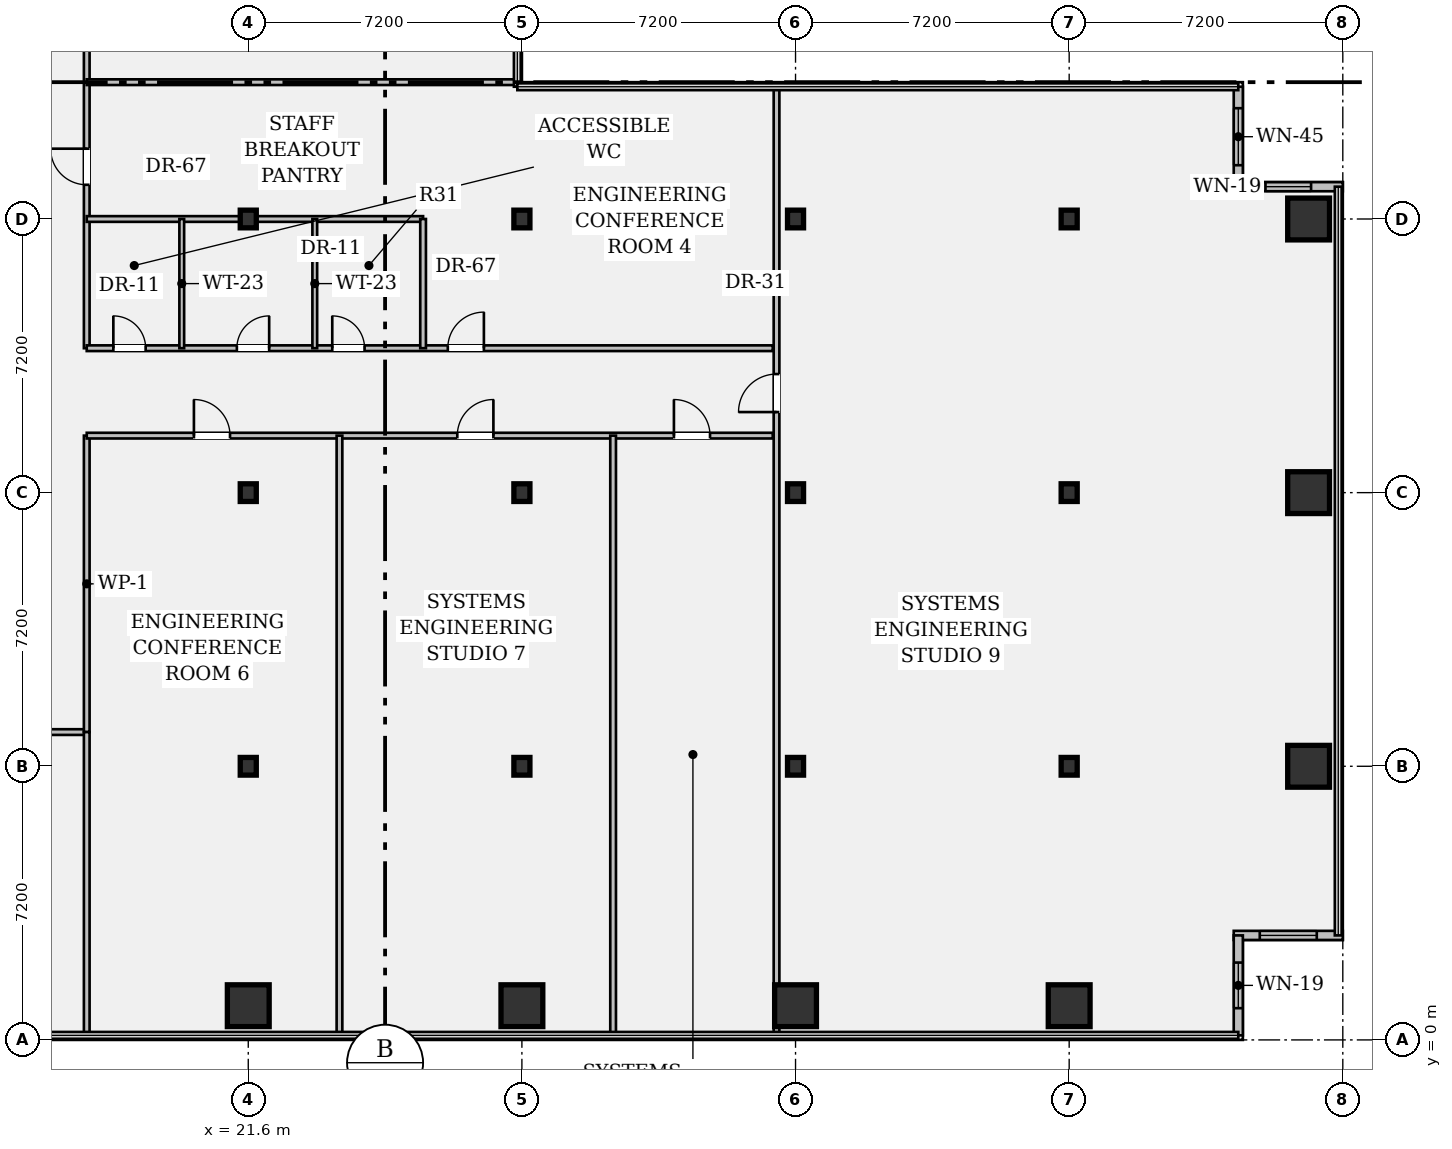
"""IFC4 building model, lengths in metres.
Left out: names, types, materials, properties, quantities, classifications, styles, units other than length and angle.
Written with IfcOpenShell. Run it as: python <this file> out.ifc"""

import sys

from ifc_helpers import new_model, si_unit, direction, frame, frame_2d, origin, origin_2d, place, context, subcontext, project, spatial, rectangle, hollow_rectangle, i_section, extrude, element, fill, save


model = new_model("IFC4")
c1 = context("Model", 3, precision=1e-05, world=origin(), true_north=direction((0.0, 1.0)))
c2 = subcontext(c1, "Body", "Model", "MODEL_VIEW")
j1 = project(units=[si_unit("LENGTHUNIT", "METRE"), si_unit("PLANEANGLEUNIT", "RADIAN")], contexts=[c1])
p1 = place(None, origin())
s1 = spatial("IfcSite", under=j1, at=p1, CompositionType="ELEMENT")
p2 = place(p1, origin())
s2 = spatial("IfcBuilding", under=s1, at=p2, CompositionType="ELEMENT")
p3 = place(p2, frame((0.0, 0.0, 42.7)))
s3 = spatial("IfcBuildingStorey", under=s2, at=p3, CompositionType="ELEMENT", Elevation=42.7)
p4 = place(p3, frame((21.6, 0.9, 0.0), z_axis=(0.0, 0.0, 1.0), x_axis=(1.0, 0.0, 0.0)))
e1 = element("IfcColumn", 1, at=p4, inside=s3, PredefinedType="COLUMN", context=c2, shape_type="SweptSolid", body=[
    extrude(hollow_rectangle(XDim=1.1, YDim=1.1, WallThickness=0.07, at=origin_2d()), origin(), (0.0, 0.0, 1.0), 3.57),
])
for number, where, z_axis, x_axis in (
    (2, (21.6, 7.2, 0.0), (0.0, 0.0, 1.0), (1.0, 0.0, 0.0)),
    (3, (21.6, 14.4, 0.0), (0.0, 0.0, 1.0), (1.0, 0.0, 0.0)),
    (4, (21.6, 21.6, 0.0), (0.0, 0.0, 1.0), (1.0, 0.0, 0.0)),
):
    element("IfcColumn", number, at=place(p3, frame(where, z_axis=z_axis, x_axis=x_axis)), inside=s3, PredefinedType="COLUMN", context=c2, shape_type="SweptSolid", body=[
        extrude(i_section(OverallWidth=0.422, OverallDepth=0.465, WebThickness=0.045, FlangeThickness=0.073, FilletRadius=0.018, at=origin_2d()), origin(), (0.0, 0.0, 1.0), 3.57),
    ])
p5 = place(p3, frame((28.8, 0.9, 0.0), z_axis=(0.0, 0.0, 1.0), x_axis=(1.0, 0.0, 0.0)))
e5 = element("IfcColumn", 5, at=p5, inside=s3, PredefinedType="COLUMN", context=c2, shape_type="SweptSolid", body=[
    extrude(hollow_rectangle(XDim=1.1, YDim=1.1, WallThickness=0.07, at=origin_2d()), origin(), (0.0, 0.0, 1.0), 3.57),
])
for number, where, z_axis, x_axis in (
    (6, (28.8, 7.2, 0.0), (0.0, 0.0, 1.0), (1.0, 0.0, 0.0)),
    (7, (28.8, 14.4, 0.0), (0.0, 0.0, 1.0), (1.0, 0.0, 0.0)),
    (8, (28.8, 21.6, 0.0), (0.0, 0.0, 1.0), (1.0, 0.0, 0.0)),
):
    element("IfcColumn", number, at=place(p3, frame(where, z_axis=z_axis, x_axis=x_axis)), inside=s3, PredefinedType="COLUMN", context=c2, shape_type="SweptSolid", body=[
        extrude(i_section(OverallWidth=0.422, OverallDepth=0.465, WebThickness=0.045, FlangeThickness=0.073, FilletRadius=0.018, at=origin_2d()), origin(), (0.0, 0.0, 1.0), 3.57),
    ])
p6 = place(p3, frame((36.0, 0.9, 0.0), z_axis=(0.0, 0.0, 1.0), x_axis=(1.0, 0.0, 0.0)))
e9 = element("IfcColumn", 9, at=p6, inside=s3, PredefinedType="COLUMN", context=c2, shape_type="SweptSolid", body=[
    extrude(hollow_rectangle(XDim=1.1, YDim=1.1, WallThickness=0.07, at=origin_2d()), origin(), (0.0, 0.0, 1.0), 3.57),
])
for number, where, z_axis, x_axis in (
    (10, (36.0, 7.2, 0.0), (0.0, 0.0, 1.0), (1.0, 0.0, 0.0)),
    (11, (36.0, 14.4, 0.0), (0.0, 0.0, 1.0), (1.0, 0.0, 0.0)),
    (12, (36.0, 21.6, 0.0), (0.0, 0.0, 1.0), (1.0, 0.0, 0.0)),
):
    element("IfcColumn", number, at=place(p3, frame(where, z_axis=z_axis, x_axis=x_axis)), inside=s3, PredefinedType="COLUMN", context=c2, shape_type="SweptSolid", body=[
        extrude(i_section(OverallWidth=0.422, OverallDepth=0.465, WebThickness=0.045, FlangeThickness=0.073, FilletRadius=0.018, at=origin_2d()), origin(), (0.0, 0.0, 1.0), 3.57),
    ])
p7 = place(p3, frame((43.2, 0.9, 0.0), z_axis=(0.0, 0.0, 1.0), x_axis=(1.0, 0.0, 0.0)))
e13 = element("IfcColumn", 13, at=p7, inside=s3, PredefinedType="COLUMN", context=c2, shape_type="SweptSolid", body=[
    extrude(hollow_rectangle(XDim=1.1, YDim=1.1, WallThickness=0.07, at=origin_2d()), origin(), (0.0, 0.0, 1.0), 3.57),
])
for number, where, z_axis, x_axis in (
    (14, (43.2, 7.2, 0.0), (0.0, 0.0, 1.0), (1.0, 0.0, 0.0)),
    (15, (43.2, 14.4, 0.0), (0.0, 0.0, 1.0), (1.0, 0.0, 0.0)),
    (16, (43.2, 21.6, 0.0), (0.0, 0.0, 1.0), (1.0, 0.0, 0.0)),
):
    element("IfcColumn", number, at=place(p3, frame(where, z_axis=z_axis, x_axis=x_axis)), inside=s3, PredefinedType="COLUMN", context=c2, shape_type="SweptSolid", body=[
        extrude(i_section(OverallWidth=0.422, OverallDepth=0.465, WebThickness=0.045, FlangeThickness=0.073, FilletRadius=0.018, at=origin_2d()), origin(), (0.0, 0.0, 1.0), 3.57),
    ])
for number, where, z_axis, x_axis in (
    (17, (49.5, 7.2, 0.0), (0.0, 0.0, 1.0), (1.0, 0.0, 0.0)),
    (18, (49.5, 14.4, 0.0), (0.0, 0.0, 1.0), (1.0, 0.0, 0.0)),
    (19, (49.5, 21.6, 0.0), (0.0, 0.0, 1.0), (1.0, 0.0, 0.0)),
):
    element("IfcColumn", number, at=place(p3, frame(where, z_axis=z_axis, x_axis=x_axis)), inside=s3, PredefinedType="COLUMN", context=c2, shape_type="SweptSolid", body=[
        extrude(hollow_rectangle(XDim=1.1, YDim=1.1, WallThickness=0.07, at=origin_2d()), origin(), (0.0, 0.0, 1.0), 3.57),
    ])
p8 = place(p3, frame((47.65, 25.08, 0.0), z_axis=(0.0, 0.0, 1.0), x_axis=(0.0, -1.0, 0.0)))
e20 = element("IfcWall", 20, at=p8, inside=s3, PredefinedType="STANDARD", context=c2, shape_type="SweptSolid", body=[
    extrude(rectangle(XDim=2.63, YDim=0.24, at=frame_2d((1.315, 0.0))), origin(), (0.0, 0.0, 1.0), 3.57),
])
p9 = place(p8, frame((0.565, 0.0, 0.95)))
e21 = element("IfcOpeningElement", 21, at=p9, cuts=e20, PredefinedType="OPENING", context=c2, shape_type="SweptSolid", body=[
    extrude(rectangle(XDim=1.5, YDim=1.8, at=frame_2d((0.75, 0.9))), frame((0.0, 0.132, 0.0), z_axis=(0.0, -1.0, 0.0), x_axis=(1.0, 0.0, 0.0)), (0.0, 0.0, 1.0), 0.264),
])
p10 = place(p3, frame((47.53, 22.45, 0.0), z_axis=(0.0, 0.0, 1.0), x_axis=(1.0, 0.0, 0.0)))
e22 = element("IfcWall", 22, at=p10, inside=s3, PredefinedType="STANDARD", context=c2, shape_type="SweptSolid", body=[
    extrude(rectangle(XDim=2.87, YDim=0.24, at=frame_2d((1.435, 0.0))), origin(), (0.0, 0.0, 1.0), 3.57),
])
p11 = place(p10, frame((0.835, 0.0, 0.95)))
e23 = element("IfcOpeningElement", 23, at=p11, cuts=e22, PredefinedType="OPENING", context=c2, shape_type="SweptSolid", body=[
    extrude(rectangle(XDim=1.2, YDim=1.8, at=frame_2d((0.6, 0.9))), frame((0.0, 0.132, 0.0), z_axis=(0.0, -1.0, 0.0), x_axis=(1.0, 0.0, 0.0)), (0.0, 0.0, 1.0), 0.264),
])
p12 = place(p3, frame((50.4, 2.75, 0.0), z_axis=(0.0, 0.0, 1.0), x_axis=(-1.0, 0.0, 0.0)))
e24 = element("IfcWall", 24, at=p12, inside=s3, PredefinedType="STANDARD", context=c2, shape_type="SweptSolid", body=[
    extrude(rectangle(XDim=2.87, YDim=0.24, at=frame_2d((1.435, 0.0))), origin(), (0.0, 0.0, 1.0), 3.57),
])
p13 = place(p12, frame((0.685, 0.0, 0.95)))
e25 = element("IfcOpeningElement", 25, at=p13, cuts=e24, PredefinedType="OPENING", context=c2, shape_type="SweptSolid", body=[
    extrude(rectangle(XDim=1.5, YDim=1.8, at=frame_2d((0.75, 0.9))), frame((0.0, 0.132, 0.0), z_axis=(0.0, -1.0, 0.0), x_axis=(1.0, 0.0, 0.0)), (0.0, 0.0, 1.0), 0.264),
])
p14 = place(p3, frame((47.65, 2.75, 0.0), z_axis=(0.0, 0.0, 1.0), x_axis=(0.0, -1.0, 0.0)))
e26 = element("IfcWall", 26, at=p14, inside=s3, PredefinedType="STANDARD", context=c2, shape_type="SweptSolid", body=[
    extrude(rectangle(XDim=2.63, YDim=0.24, at=frame_2d((1.315, 0.0))), origin(), (0.0, 0.0, 1.0), 3.57),
])
p15 = place(p14, frame((0.715, 0.0, 0.95)))
e27 = element("IfcOpeningElement", 27, at=p15, cuts=e26, PredefinedType="OPENING", context=c2, shape_type="SweptSolid", body=[
    extrude(rectangle(XDim=1.2, YDim=1.8, at=frame_2d((0.6, 0.9))), frame((0.0, 0.132, 0.0), z_axis=(0.0, -1.0, 0.0), x_axis=(1.0, 0.0, 0.0)), (0.0, 0.0, 1.0), 0.264),
])
p16 = place(p3, frame((14.4, 8.1, 0.0), z_axis=(0.0, 0.0, 1.0), x_axis=(1.0, 0.0, 0.0)))
e28 = element("IfcWall", 28, at=p16, inside=s3, PredefinedType="PARTITIONING", context=c2, shape_type="SweptSolid", body=[
    extrude(rectangle(XDim=2.95, YDim=0.15, at=frame_2d((1.475, 0.0))), origin(), (0.0, 0.0, 1.0), 3.088),
])
p17 = place(p16, frame((0.95, 0.0, 0.0)))
e29 = element("IfcOpeningElement", 29, at=p17, cuts=e28, PredefinedType="OPENING", context=c2, shape_type="SweptSolid", body=[
    extrude(rectangle(XDim=0.95, YDim=2.15, at=frame_2d((0.475, 1.075))), frame((0.0, 0.087, 0.0), z_axis=(0.0, -1.0, 0.0), x_axis=(1.0, 0.0, 0.0)), (0.0, 0.0, 1.0), 0.174),
])
p18 = place(p3, frame((17.35, 8.1, 0.0), z_axis=(0.0, 0.0, 1.0), x_axis=(0.0, 1.0, 0.0)))
e30 = element("IfcWall", 30, at=p18, inside=s3, PredefinedType="PARTITIONING", context=c2, shape_type="SweptSolid", body=[
    extrude(rectangle(XDim=7.8, YDim=0.15, at=frame_2d((3.9, 0.0))), origin(), (0.0, 0.0, 1.0), 2.699),
])
p19 = place(p3, frame((17.35, 18.2, 0.0), z_axis=(0.0, 0.0, 1.0), x_axis=(0.0, 1.0, 0.0)))
e31 = element("IfcWall", 31, at=p19, inside=s3, PredefinedType="PARTITIONING", context=c2, shape_type="SweptSolid", body=[
    extrude(rectangle(XDim=17.7, YDim=0.15, at=frame_2d((8.85, 0.0))), origin(), (0.0, 0.0, 1.0), 2.699),
])
p20 = place(p19, frame((4.3, 0.0, 0.0)))
e32 = element("IfcOpeningElement", 32, at=p20, cuts=e31, PredefinedType="OPENING", context=c2, shape_type="SweptSolid", body=[
    extrude(rectangle(XDim=0.95, YDim=2.15, at=frame_2d((0.475, 1.075))), frame((0.0, 0.087, 0.0), z_axis=(0.0, -1.0, 0.0), x_axis=(1.0, 0.0, 0.0)), (0.0, 0.0, 1.0), 0.174),
])
p21 = place(p19, frame((8.4, 0.0, 0.0)))
e33 = element("IfcOpeningElement", 33, at=p21, cuts=e31, PredefinedType="OPENING", context=c2, shape_type="SweptSolid", body=[
    extrude(rectangle(XDim=1.0, YDim=2.15, at=frame_2d((0.5, 1.075))), frame((0.0, 0.087, 0.0), z_axis=(0.0, -1.0, 0.0), x_axis=(1.0, 0.0, 0.0)), (0.0, 0.0, 1.0), 0.174),
])
p22 = place(p3, frame((17.35, 15.9, 0.0), z_axis=(0.0, 0.0, 1.0), x_axis=(1.0, 0.0, 0.0)))
e34 = element("IfcWall", 34, at=p22, inside=s3, PredefinedType="PARTITIONING", context=c2, shape_type="SweptSolid", body=[
    extrude(rectangle(XDim=18.05, YDim=0.15, at=frame_2d((9.025, 0.0))), origin(), (0.0, 0.0, 1.0), 2.699),
])
p23 = place(p22, frame((2.82, 0.0, 0.0)))
e35 = element("IfcOpeningElement", 35, at=p23, cuts=e34, PredefinedType="OPENING", context=c2, shape_type="SweptSolid", body=[
    extrude(rectangle(XDim=0.95, YDim=2.15, at=frame_2d((0.475, 1.075))), frame((0.0, 0.087, 0.0), z_axis=(0.0, -1.0, 0.0), x_axis=(1.0, 0.0, 0.0)), (0.0, 0.0, 1.0), 0.174),
])
p24 = place(p22, frame((9.75, 0.0, 0.0)))
e36 = element("IfcOpeningElement", 36, at=p24, cuts=e34, PredefinedType="OPENING", context=c2, shape_type="SweptSolid", body=[
    extrude(rectangle(XDim=0.95, YDim=2.15, at=frame_2d((0.475, 1.075))), frame((0.0, 0.087, 0.0), z_axis=(0.0, -1.0, 0.0), x_axis=(1.0, 0.0, 0.0)), (0.0, 0.0, 1.0), 0.174),
])
p25 = place(p22, frame((15.45, 0.0, 0.0)))
e37 = element("IfcOpeningElement", 37, at=p25, cuts=e34, PredefinedType="OPENING", context=c2, shape_type="SweptSolid", body=[
    extrude(rectangle(XDim=0.95, YDim=2.15, at=frame_2d((0.475, 1.075))), frame((0.0, 0.087, 0.0), z_axis=(0.0, -1.0, 0.0), x_axis=(1.0, 0.0, 0.0)), (0.0, 0.0, 1.0), 0.174),
])
p26 = place(p3, frame((17.35, 18.2, 0.0), z_axis=(0.0, 0.0, 1.0), x_axis=(1.0, 0.0, 0.0)))
e38 = element("IfcWall", 38, at=p26, inside=s3, PredefinedType="PARTITIONING", context=c2, shape_type="SweptSolid", body=[
    extrude(rectangle(XDim=18.05, YDim=0.15, at=frame_2d((9.025, 0.0))), origin(), (0.0, 0.0, 1.0), 2.699),
])
p27 = place(p26, frame((0.7, 0.0, 0.0)))
e39 = element("IfcOpeningElement", 39, at=p27, cuts=e38, PredefinedType="OPENING", context=c2, shape_type="SweptSolid", body=[
    extrude(rectangle(XDim=0.85, YDim=2.15, at=frame_2d((0.425, 1.075))), frame((0.0, 0.087, 0.0), z_axis=(0.0, -1.0, 0.0), x_axis=(1.0, 0.0, 0.0)), (0.0, 0.0, 1.0), 0.174),
])
p28 = place(p26, frame((3.95, 0.0, 0.0)))
e40 = element("IfcOpeningElement", 40, at=p28, cuts=e38, PredefinedType="OPENING", context=c2, shape_type="SweptSolid", body=[
    extrude(rectangle(XDim=0.85, YDim=2.15, at=frame_2d((0.425, 1.075))), frame((0.0, 0.087, 0.0), z_axis=(0.0, -1.0, 0.0), x_axis=(1.0, 0.0, 0.0)), (0.0, 0.0, 1.0), 0.174),
])
p29 = place(p26, frame((6.46, 0.0, 0.0)))
e41 = element("IfcOpeningElement", 41, at=p29, cuts=e38, PredefinedType="OPENING", context=c2, shape_type="SweptSolid", body=[
    extrude(rectangle(XDim=0.85, YDim=2.15, at=frame_2d((0.425, 1.075))), frame((0.0, 0.087, 0.0), z_axis=(0.0, -1.0, 0.0), x_axis=(1.0, 0.0, 0.0)), (0.0, 0.0, 1.0), 0.174),
])
p30 = place(p26, frame((9.5, 0.0, 0.0)))
e42 = element("IfcOpeningElement", 42, at=p30, cuts=e38, PredefinedType="OPENING", context=c2, shape_type="SweptSolid", body=[
    extrude(rectangle(XDim=0.95, YDim=2.15, at=frame_2d((0.475, 1.075))), frame((0.0, 0.087, 0.0), z_axis=(0.0, -1.0, 0.0), x_axis=(1.0, 0.0, 0.0)), (0.0, 0.0, 1.0), 0.174),
])
p31 = place(p3, frame((35.5, 0.12, 0.0), z_axis=(0.0, 0.0, 1.0), x_axis=(0.0, 1.0, 0.0)))
e43 = element("IfcWall", 43, at=p31, inside=s3, PredefinedType="PARTITIONING", context=c2, shape_type="SweptSolid", body=[
    extrude(rectangle(XDim=24.96, YDim=0.15, at=frame_2d((12.48, 0.0))), origin(), (0.0, 0.0, 1.0), 2.699),
])
p32 = place(p31, frame((16.4, 0.0, 0.0)))
e44 = element("IfcOpeningElement", 44, at=p32, cuts=e43, PredefinedType="OPENING", context=c2, shape_type="SweptSolid", body=[
    extrude(rectangle(XDim=1.0, YDim=2.15, at=frame_2d((0.5, 1.075))), frame((0.0, 0.087, 0.0), z_axis=(0.0, -1.0, 0.0), x_axis=(1.0, 0.0, 0.0)), (0.0, 0.0, 1.0), 0.174),
])
p33 = place(p3, frame((17.35, 21.6, 0.0), z_axis=(0.0, 0.0, 1.0), x_axis=(1.0, 0.0, 0.0)))
e45 = element("IfcWall", 45, at=p33, inside=s3, PredefinedType="PARTITIONING", context=c2, shape_type="SweptSolid", body=[
    extrude(rectangle(XDim=8.85, YDim=0.15, at=frame_2d((4.425, 0.0))), origin(), (0.0, 0.0, 1.0), 2.699),
])
p34 = place(p3, frame((26.2, 18.2, 0.0), z_axis=(0.0, 0.0, 1.0), x_axis=(0.0, 1.0, 0.0)))
e46 = element("IfcWall", 46, at=p34, inside=s3, PredefinedType="PARTITIONING", context=c2, shape_type="SweptSolid", body=[
    extrude(rectangle(XDim=3.4, YDim=0.15, at=frame_2d((1.7, 0.0))), origin(), (0.0, 0.0, 1.0), 2.699),
])
for number, where, z_axis, x_axis in (
    (47, (19.85, 18.2, 0.0), (0.0, 0.0, 1.0), (0.0, 1.0, 0.0)),
    (48, (23.35, 18.2, 0.0), (0.0, 0.0, 1.0), (0.0, 1.0, 0.0)),
):
    element("IfcWall", number, at=place(p3, frame(where, z_axis=z_axis, x_axis=x_axis)), inside=s3, PredefinedType="PARTITIONING", context=c2, shape_type="SweptSolid", body=[
        extrude(rectangle(XDim=3.4, YDim=0.125, at=frame_2d((1.7, 0.0))), origin(), (0.0, 0.0, 1.0), 2.699),
    ])
p35 = place(p3, frame((17.35, 25.2, 0.0), z_axis=(0.0, 0.0, 1.0), x_axis=(1.0, 0.0, 0.0)))
e49 = element("IfcWall", 49, at=p35, inside=s3, PredefinedType="PARTITIONING", context=c2, shape_type="SweptSolid", body=[
    extrude(rectangle(XDim=11.33, YDim=0.15, at=frame_2d((5.665, 0.0))), origin(), (0.0, 0.0, 1.0), 2.699),
])
p36 = place(p3, frame((17.35, 0.12, 0.0), z_axis=(0.0, 0.0, 1.0), x_axis=(0.0, 1.0, 0.0)))
e50 = element("IfcWall", 50, at=p36, inside=s3, PredefinedType="PARTITIONING", context=c2, shape_type="SweptSolid", body=[
    extrude(rectangle(XDim=7.98, YDim=0.15, at=frame_2d((3.99, 0.0))), origin(), (0.0, 0.0, 1.0), 2.699),
])
for number, where, z_axis, x_axis in (
    (51, (24.0, 0.12, 0.0), (0.0, 0.0, 1.0), (0.0, 1.0, 0.0)),
    (52, (31.2, 0.12, 0.0), (0.0, 0.0, 1.0), (0.0, 1.0, 0.0)),
):
    element("IfcWall", number, at=place(p3, frame(where, z_axis=z_axis, x_axis=x_axis)), inside=s3, PredefinedType="PARTITIONING", context=c2, shape_type="SweptSolid", body=[
        extrude(rectangle(XDim=15.78, YDim=0.15, at=frame_2d((7.89, 0.0))), origin(), (0.0, 0.0, 1.0), 2.699),
    ])
p37 = place(p9, origin())
e53 = element("IfcWindow", 53, at=p37, inside=s3, PartitioningType="SINGLE_PANEL", PredefinedType="WINDOW", context=c2, shape_type="SweptSolid", body=[
    extrude(rectangle(XDim=1.5, YDim=1.8, at=frame_2d((0.75, 0.9))), frame((0.0, 0.03, 0.0), z_axis=(0.0, -1.0, 0.0), x_axis=(1.0, 0.0, 0.0)), (0.0, 0.0, 1.0), 0.06),
])
fill(e21, e53)
p38 = place(p11, origin())
e54 = element("IfcWindow", 54, at=p38, inside=s3, PartitioningType="SINGLE_PANEL", PredefinedType="WINDOW", context=c2, shape_type="SweptSolid", body=[
    extrude(rectangle(XDim=1.2, YDim=1.8, at=frame_2d((0.6, 0.9))), frame((0.0, 0.03, 0.0), z_axis=(0.0, -1.0, 0.0), x_axis=(1.0, 0.0, 0.0)), (0.0, 0.0, 1.0), 0.06),
])
fill(e23, e54)
p39 = place(p13, origin())
e55 = element("IfcWindow", 55, at=p39, inside=s3, PartitioningType="SINGLE_PANEL", PredefinedType="WINDOW", context=c2, shape_type="SweptSolid", body=[
    extrude(rectangle(XDim=1.5, YDim=1.8, at=frame_2d((0.75, 0.9))), frame((0.0, 0.03, 0.0), z_axis=(0.0, -1.0, 0.0), x_axis=(1.0, 0.0, 0.0)), (0.0, 0.0, 1.0), 0.06),
])
fill(e25, e55)
p40 = place(p15, origin())
e56 = element("IfcWindow", 56, at=p40, inside=s3, PartitioningType="SINGLE_PANEL", PredefinedType="WINDOW", context=c2, shape_type="SweptSolid", body=[
    extrude(rectangle(XDim=1.2, YDim=1.8, at=frame_2d((0.6, 0.9))), frame((0.0, 0.03, 0.0), z_axis=(0.0, -1.0, 0.0), x_axis=(1.0, 0.0, 0.0)), (0.0, 0.0, 1.0), 0.06),
])
fill(e27, e56)
p41 = place(p27, origin())
e57 = element("IfcDoor", 57, at=p41, inside=s3, OperationType="SINGLE_SWING_LEFT", PredefinedType="DOOR", context=c2, shape_type="SweptSolid", body=[
    extrude(rectangle(XDim=0.85, YDim=2.15, at=frame_2d((0.425, 1.075))), frame((0.0, 0.025, 0.0), z_axis=(0.0, -1.0, 0.0), x_axis=(1.0, 0.0, 0.0)), (0.0, 0.0, 1.0), 0.05),
])
fill(e39, e57)
p42 = place(p28, origin())
e58 = element("IfcDoor", 58, at=p42, inside=s3, OperationType="SINGLE_SWING_RIGHT", PredefinedType="DOOR", context=c2, shape_type="SweptSolid", body=[
    extrude(rectangle(XDim=0.85, YDim=2.15, at=frame_2d((0.425, 1.075))), frame((0.0, 0.025, 0.0), z_axis=(0.0, -1.0, 0.0), x_axis=(1.0, 0.0, 0.0)), (0.0, 0.0, 1.0), 0.05),
])
fill(e40, e58)
p43 = place(p29, origin())
e59 = element("IfcDoor", 59, at=p43, inside=s3, OperationType="SINGLE_SWING_LEFT", PredefinedType="DOOR", context=c2, shape_type="SweptSolid", body=[
    extrude(rectangle(XDim=0.85, YDim=2.15, at=frame_2d((0.425, 1.075))), frame((0.0, 0.025, 0.0), z_axis=(0.0, -1.0, 0.0), x_axis=(1.0, 0.0, 0.0)), (0.0, 0.0, 1.0), 0.05),
])
fill(e41, e59)
p44 = place(p20, origin())
e60 = element("IfcDoor", 60, at=p44, inside=s3, OperationType="SINGLE_SWING_RIGHT", PredefinedType="DOOR", context=c2, shape_type="SweptSolid", body=[
    extrude(rectangle(XDim=0.95, YDim=2.15, at=frame_2d((0.475, 1.075))), frame((0.0, 0.025, 0.0), z_axis=(0.0, -1.0, 0.0), x_axis=(1.0, 0.0, 0.0)), (0.0, 0.0, 1.0), 0.05),
])
fill(e32, e60)
p45 = place(p30, origin())
e61 = element("IfcDoor", 61, at=p45, inside=s3, OperationType="SINGLE_SWING_RIGHT", PredefinedType="DOOR", context=c2, shape_type="SweptSolid", body=[
    extrude(rectangle(XDim=0.95, YDim=2.15, at=frame_2d((0.475, 1.075))), frame((0.0, 0.025, 0.0), z_axis=(0.0, -1.0, 0.0), x_axis=(1.0, 0.0, 0.0)), (0.0, 0.0, 1.0), 0.05),
])
fill(e42, e61)
p46 = place(p23, origin())
e62 = element("IfcDoor", 62, at=p46, inside=s3, OperationType="SINGLE_SWING_LEFT", PredefinedType="DOOR", context=c2, shape_type="SweptSolid", body=[
    extrude(rectangle(XDim=0.95, YDim=2.15, at=frame_2d((0.475, 1.075))), frame((0.0, 0.025, 0.0), z_axis=(0.0, -1.0, 0.0), x_axis=(1.0, 0.0, 0.0)), (0.0, 0.0, 1.0), 0.05),
])
fill(e35, e62)
p47 = place(p24, origin())
e63 = element("IfcDoor", 63, at=p47, inside=s3, OperationType="SINGLE_SWING_RIGHT", PredefinedType="DOOR", context=c2, shape_type="SweptSolid", body=[
    extrude(rectangle(XDim=0.95, YDim=2.15, at=frame_2d((0.475, 1.075))), frame((0.0, 0.025, 0.0), z_axis=(0.0, -1.0, 0.0), x_axis=(1.0, 0.0, 0.0)), (0.0, 0.0, 1.0), 0.05),
])
fill(e36, e63)
p48 = place(p25, origin())
e64 = element("IfcDoor", 64, at=p48, inside=s3, OperationType="SINGLE_SWING_LEFT", PredefinedType="DOOR", context=c2, shape_type="SweptSolid", body=[
    extrude(rectangle(XDim=0.95, YDim=2.15, at=frame_2d((0.475, 1.075))), frame((0.0, 0.025, 0.0), z_axis=(0.0, -1.0, 0.0), x_axis=(1.0, 0.0, 0.0)), (0.0, 0.0, 1.0), 0.05),
])
fill(e37, e64)
p49 = place(p32, origin())
e65 = element("IfcDoor", 65, at=p49, inside=s3, OperationType="SINGLE_SWING_LEFT", PredefinedType="DOOR", context=c2, shape_type="SweptSolid", body=[
    extrude(rectangle(XDim=1.0, YDim=2.15, at=frame_2d((0.5, 1.075))), frame((0.0, 0.025, 0.0), z_axis=(0.0, -1.0, 0.0), x_axis=(1.0, 0.0, 0.0)), (0.0, 0.0, 1.0), 0.05),
])
fill(e44, e65)
save(model, sys.argv[1])
